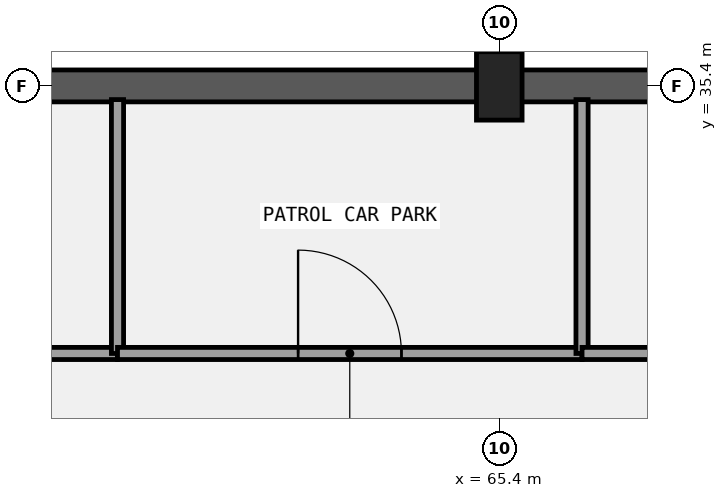
"""IFC4 building model, lengths in metres.
Left out: names, types, materials, properties, quantities, classifications, styles, units other than length and angle.
Written with IfcOpenShell. Run it as: python <this file> out.ifc"""

import sys

from ifc_helpers import new_model, si_unit, direction, frame, frame_2d, origin, origin_2d, place, context, subcontext, project, spatial, rectangle, extrude, element, fill, save


model = new_model("IFC4")
c1 = context("Model", 3, precision=1e-05, world=origin(), true_north=direction((0.0, 1.0)))
c2 = subcontext(c1, "Body", "Model", "MODEL_VIEW")
j1 = project(units=[si_unit("LENGTHUNIT", "METRE"), si_unit("PLANEANGLEUNIT", "RADIAN")], contexts=[c1])
p1 = place(None, origin())
s1 = spatial("IfcSite", under=j1, at=p1, CompositionType="ELEMENT")
p2 = place(p1, origin())
s2 = spatial("IfcBuilding", under=s1, at=p2, CompositionType="ELEMENT")
p3 = place(p2, frame((0.0, 0.0, -4.2)))
s3 = spatial("IfcBuildingStorey", under=s2, at=p3, CompositionType="ELEMENT", Elevation=-4.2)
p4 = place(p3, frame((29.19, 35.4, 0.0), z_axis=(0.0, 0.0, 1.0), x_axis=(1.0, 0.0, 0.0)))
e1 = element("IfcWall", 1, at=p4, inside=s3, PredefinedType="USERDEFINED", context=c2, shape_type="SweptSolid", body=[
    extrude(rectangle(XDim=43.62, YDim=0.42, at=frame_2d((21.81, 0.0))), origin(), (0.0, 0.0, 1.0), 3.03),
])
p5 = place(p3, frame((65.4, 35.4, 0.0), z_axis=(0.0, 0.0, 1.0), x_axis=(1.0, 0.0, 0.0)))
e2 = element("IfcColumn", 2, at=p5, inside=s3, PredefinedType="COLUMN", context=c2, shape_type="SweptSolid", body=[
    extrude(rectangle(XDim=0.6, YDim=0.9, at=origin_2d()), origin(), (0.0, 0.0, 1.0), 4.2),
])
p6 = place(p3, frame((54.266, 31.88, 0.0), z_axis=(0.0, 0.0, 1.0), x_axis=(1.0, 0.0, 0.0)))
e3 = element("IfcWall", 3, at=p6, inside=s3, PredefinedType="PARTITIONING", context=c2, shape_type="SweptSolid", body=[
    extrude(rectangle(XDim=6.111, YDim=0.16, at=frame_2d((3.055, 0.0))), origin(), (0.0, 0.0, 1.0), 3.33),
])
p7 = place(p6, frame((2.446, 0.0, 0.0)))
e4 = element("IfcOpeningElement", 4, at=p7, cuts=e3, PredefinedType="OPENING", context=c2, shape_type="SweptSolid", body=[
    extrude(rectangle(XDim=1.22, YDim=2.35, at=frame_2d((0.61, 1.175))), frame((0.0, 0.09, 0.0), z_axis=(0.0, -1.0, 0.0), x_axis=(1.0, 0.0, 0.0)), (0.0, 0.0, 1.0), 0.18),
])
p8 = place(p3, frame((60.377, 31.88, 0.0), z_axis=(0.0, 0.0, 1.0), x_axis=(0.0, 1.0, 0.0)))
e5 = element("IfcWall", 5, at=p8, inside=s3, PredefinedType="PARTITIONING", context=c2, shape_type="SweptSolid", body=[
    extrude(rectangle(XDim=3.34, YDim=0.16, at=frame_2d((1.67, 0.0))), origin(), (0.0, 0.0, 1.0), 3.88),
])
p9 = place(p3, frame((60.377, 31.88, 0.0), z_axis=(0.0, 0.0, 1.0), x_axis=(1.0, 0.0, 0.0)))
e6 = element("IfcWall", 6, at=p9, inside=s3, PredefinedType="PARTITIONING", context=c2, shape_type="SweptSolid", body=[
    extrude(rectangle(XDim=6.112, YDim=0.16, at=frame_2d((3.056, 0.0))), origin(), (0.0, 0.0, 1.0), 3.33),
])
p10 = place(p9, frame((2.376, 0.0, 0.0)))
e7 = element("IfcOpeningElement", 7, at=p10, cuts=e6, PredefinedType="OPENING", context=c2, shape_type="SweptSolid", body=[
    extrude(rectangle(XDim=1.36, YDim=2.1, at=frame_2d((0.68, 1.05))), frame((0.0, 0.09, 0.0), z_axis=(0.0, -1.0, 0.0), x_axis=(1.0, 0.0, 0.0)), (0.0, 0.0, 1.0), 0.18),
])
p11 = place(p3, frame((66.489, 31.88, 0.0), z_axis=(0.0, 0.0, 1.0), x_axis=(0.0, 1.0, 0.0)))
e8 = element("IfcWall", 8, at=p11, inside=s3, PredefinedType="PARTITIONING", context=c2, shape_type="SweptSolid", body=[
    extrude(rectangle(XDim=3.34, YDim=0.16, at=frame_2d((1.67, 0.0))), origin(), (0.0, 0.0, 1.0), 3.88),
])
p12 = place(p3, frame((66.489, 31.88, 0.0), z_axis=(0.0, 0.0, 1.0), x_axis=(1.0, 0.0, 0.0)))
e9 = element("IfcWall", 9, at=p12, inside=s3, PredefinedType="PARTITIONING", context=c2, shape_type="SweptSolid", body=[
    extrude(rectangle(XDim=6.111, YDim=0.16, at=frame_2d((3.056, 0.0))), origin(), (0.0, 0.0, 1.0), 3.33),
])
p13 = place(p12, frame((2.375, 0.0, 0.0)))
e10 = element("IfcOpeningElement", 10, at=p13, cuts=e9, PredefinedType="OPENING", context=c2, shape_type="SweptSolid", body=[
    extrude(rectangle(XDim=1.36, YDim=2.22, at=frame_2d((0.68, 1.11))), frame((0.0, 0.09, 0.0), z_axis=(0.0, -1.0, 0.0), x_axis=(1.0, 0.0, 0.0)), (0.0, 0.0, 1.0), 0.18),
])
p14 = place(p10, origin())
e11 = element("IfcDoor", 11, at=p14, inside=s3, OperationType="SINGLE_SWING_LEFT", PredefinedType="DOOR", context=c2, shape_type="SweptSolid", body=[
    extrude(rectangle(XDim=1.36, YDim=2.1, at=frame_2d((0.68, 1.05))), frame((0.0, 0.025, 0.0), z_axis=(0.0, -1.0, 0.0), x_axis=(1.0, 0.0, 0.0)), (0.0, 0.0, 1.0), 0.05),
])
fill(e7, e11)
save(model, sys.argv[1])
